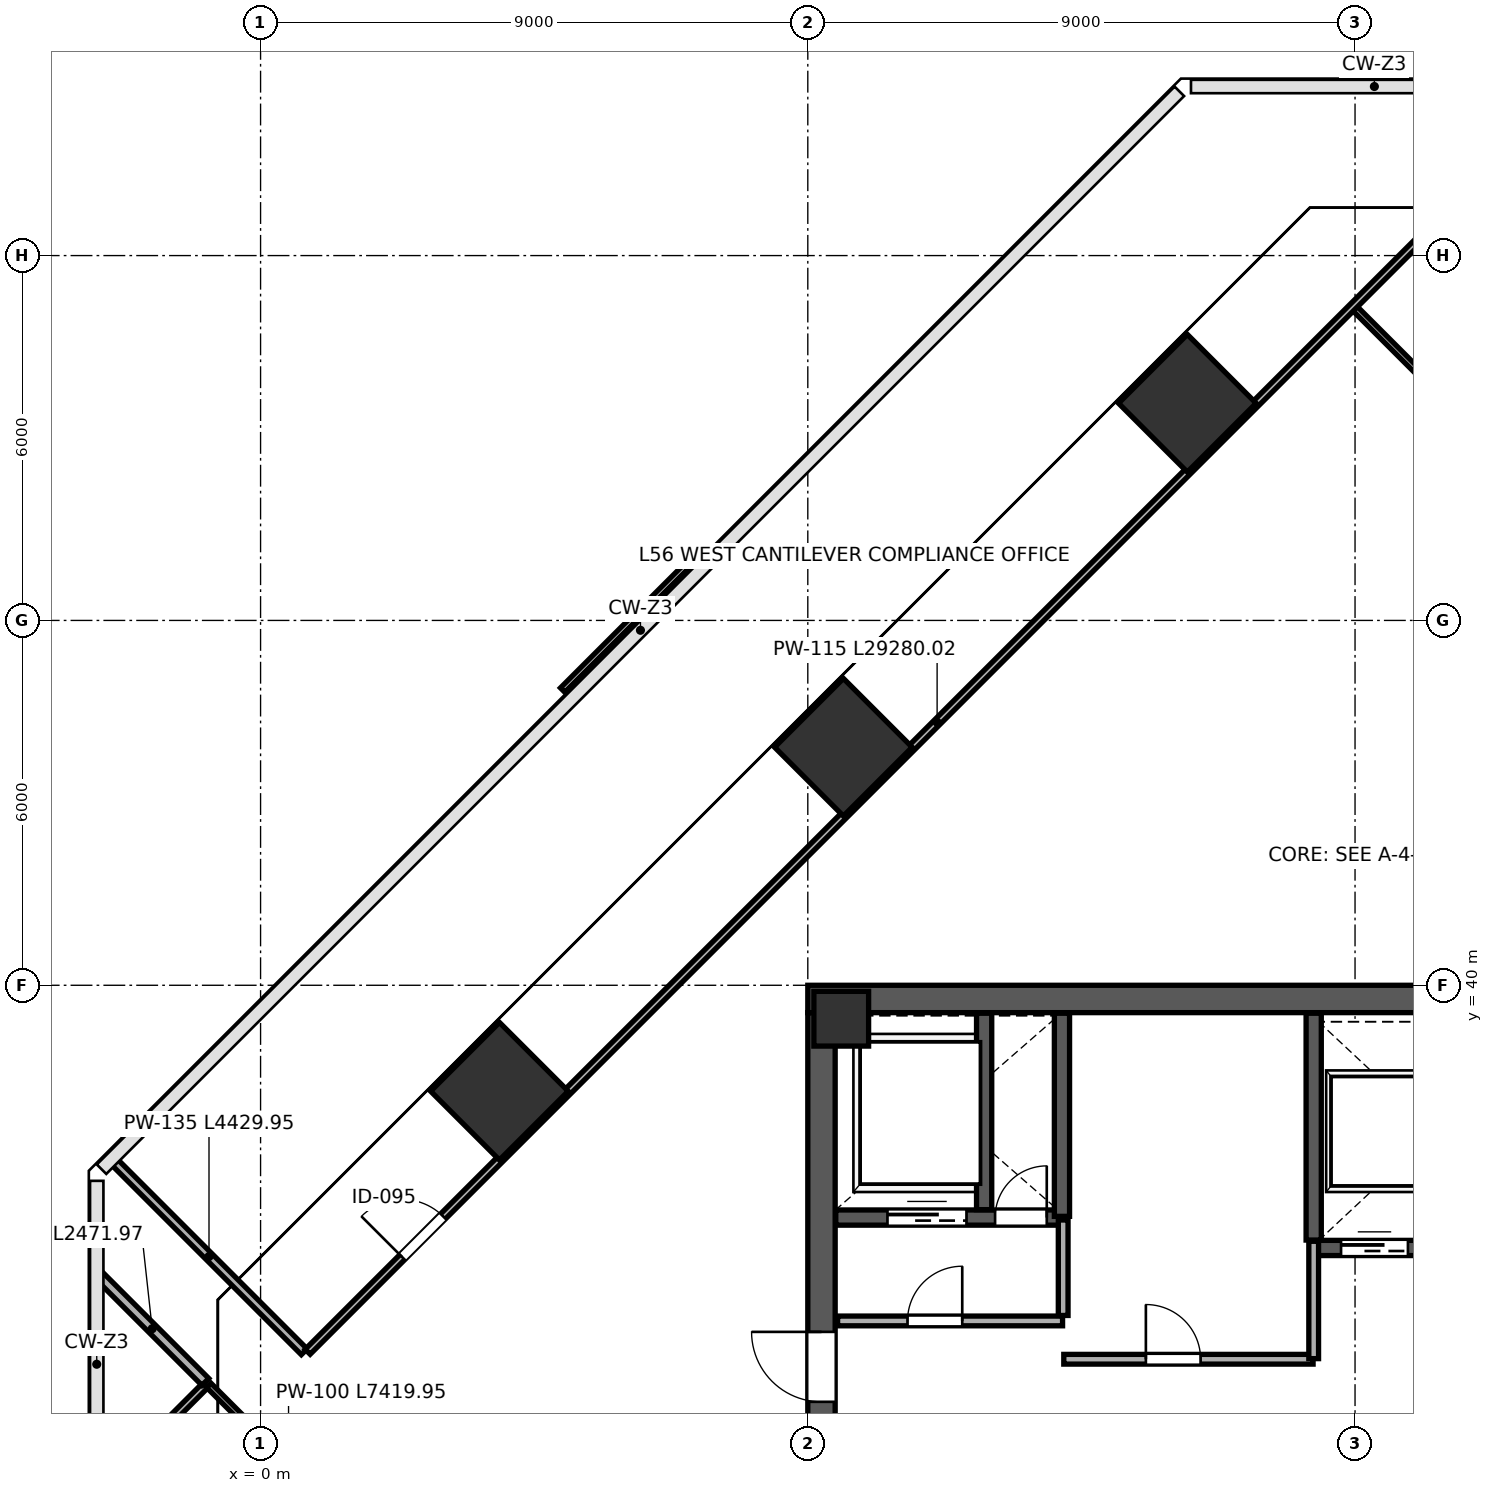
"""IFC4 building model, lengths in metres.
Left out: names, types, materials, properties, quantities, classifications, styles, units other than length and angle.
Written with IfcOpenShell. Run it as: python <this file> out.ifc"""

import sys

from ifc_helpers import new_model, si_unit, direction, frame, frame_2d, origin, origin_2d, place, context, subcontext, project, spatial, rectangle, extrude, source, transform, mapped, element, fill, save


model = new_model("IFC4")
c1 = context("Model", 3, precision=1e-05, world=origin(), true_north=direction((0.0, 1.0)))
c2 = subcontext(c1, "Body", "Model", "MODEL_VIEW")
j1 = project(units=[si_unit("LENGTHUNIT", "METRE"), si_unit("PLANEANGLEUNIT", "RADIAN")], contexts=[c1])
p1 = place(None, origin())
s1 = spatial("IfcSite", under=j1, at=p1, CompositionType="ELEMENT")
p2 = place(p1, origin())
s2 = spatial("IfcBuilding", under=s1, at=p2, CompositionType="ELEMENT")
p3 = place(p2, frame((0.0, 0.0, 250.0)))
s3 = spatial("IfcBuildingStorey", under=s2, at=p3, CompositionType="ELEMENT", Elevation=250.0)
m1 = source(origin(), c2, "Body", "SweptSolid", [
    extrude(rectangle(XDim=0.9, YDim=0.9, at=origin_2d()), origin(), (0.0, 0.0, 1.0), 4.198),
])
p4 = place(p3, frame((9.55, 39.45, 0.001), z_axis=(0.0, 0.0, 1.0), x_axis=(1.0, 0.0, 0.0)))
e1 = element("IfcColumn", 1, at=p4, inside=s3, PredefinedType="COLUMN", context=c2, shape_type="MappedRepresentation", body=[
    mapped(m1, transform((0.0, 0.0, 0.0), scale=1.0)),
])
m2 = source(origin(), c2, "Body", "SweptSolid", [
    extrude(rectangle(XDim=1.6, YDim=1.6, at=origin_2d()), origin(), (0.0, 0.0, 1.0), 4.198),
])
for number, where, z_axis, x_axis in (
    (2, (3.928, 38.258, 0.001), (0.0, 0.0, 1.0), (-0.707, 0.707, 0.0)),
    (3, (9.585, 43.915, 0.001), (0.0, 0.0, 1.0), (-0.707, 0.707, 0.0)),
    (4, (15.242, 49.572, 0.001), (0.0, 0.0, 1.0), (-0.707, 0.707, 0.0)),
):
    element("IfcColumn", number, at=place(p3, frame(where, z_axis=z_axis, x_axis=x_axis)), inside=s3, PredefinedType="COLUMN", context=c2, shape_type="MappedRepresentation", body=[
        mapped(m2, transform((0.0, 0.0, 0.0), scale=1.0)),
    ])
p5 = place(p3, frame((9.225, 24.45, 0.0), z_axis=(0.0, 0.0, 1.0), x_axis=(0.0, 1.0, 0.0)))
e5 = element("IfcWall", 5, at=p5, inside=s3, PredefinedType="SHEAR", context=c2, shape_type="SweptSolid", body=[
    extrude(rectangle(XDim=15.1, YDim=0.45, at=frame_2d((7.55, 0.0))), origin(), (0.0, 0.0, 1.0), 3.96),
])
p6 = place(p5, frame((8.7, 0.0, 0.0)))
e6 = element("IfcOpeningElement", 6, at=p6, cuts=e5, PredefinedType="OPENING", context=c2, shape_type="SweptSolid", body=[
    extrude(rectangle(XDim=1.15, YDim=2.2, at=frame_2d((0.575, 1.1))), frame((0.0, 0.235, 0.0), z_axis=(0.0, -1.0, 0.0), x_axis=(1.0, 0.0, 0.0)), (0.0, 0.0, 1.0), 0.47),
])
p7 = place(p3, frame((9.0, 39.775, 0.0), z_axis=(0.0, 0.0, 1.0), x_axis=(1.0, 0.0, 0.0)))
e7 = element("IfcWall", 7, at=p7, inside=s3, PredefinedType="SHEAR", context=c2, shape_type="SweptSolid", body=[
    extrude(rectangle(XDim=18.0, YDim=0.45, at=frame_2d((9.0, 0.0))), origin(), (0.0, 0.0, 1.0), 3.96),
])
p8 = place(p3, frame((9.46, 36.18, 0.0), z_axis=(0.0, 0.0, 1.0), x_axis=(1.0, 0.0, 0.0)))
e8 = element("IfcWall", 8, at=p8, inside=s3, PredefinedType="SHEAR", context=c2, shape_type="SweptSolid", body=[
    extrude(rectangle(XDim=3.79, YDim=0.25, at=frame_2d((1.895, 0.0))), origin(), (0.0, 0.0, 1.0), 3.96),
])
p9 = place(p8, frame((2.62, 0.0, 0.0)))
e9 = element("IfcOpeningElement", 9, at=p9, cuts=e8, PredefinedType="OPENING", context=c2, shape_type="SweptSolid", body=[
    extrude(rectangle(XDim=0.85, YDim=2.1, at=frame_2d((0.425, 1.05))), frame((0.0, 0.135, 0.0), z_axis=(0.0, -1.0, 0.0), x_axis=(1.0, 0.0, 0.0)), (0.0, 0.0, 1.0), 0.27),
])
p10 = place(p8, frame((0.85, 0.0, 0.0)))
e10 = element("IfcOpeningElement", 10, at=p10, cuts=e8, PredefinedType="OPENING", context=c2, shape_type="SweptSolid", body=[
    extrude(rectangle(XDim=1.3, YDim=2.25, at=frame_2d((0.65, 1.125))), frame((0.0, 0.135, 0.0), z_axis=(0.0, -1.0, 0.0), x_axis=(1.0, 0.0, 0.0)), (0.0, 0.0, 1.0), 0.27),
])
p11 = place(p3, frame((11.9, 36.31, 0.0), z_axis=(0.0, 0.0, 1.0), x_axis=(0.0, 1.0, 0.0)))
e11 = element("IfcWall", 11, at=p11, inside=s3, PredefinedType="SHEAR", context=c2, shape_type="SweptSolid", body=[
    extrude(rectangle(XDim=3.23, YDim=0.25, at=frame_2d((1.615, 0.0))), origin(), (0.0, 0.0, 1.0), 3.96),
])
p12 = place(p3, frame((13.18, 36.2, 0.0), z_axis=(0.0, 0.0, 1.0), x_axis=(0.0, 1.0, 0.0)))
e12 = element("IfcWall", 12, at=p12, inside=s3, PredefinedType="SHEAR", context=c2, shape_type="SweptSolid", body=[
    extrude(rectangle(XDim=3.34, YDim=0.25, at=frame_2d((1.67, 0.0))), origin(), (0.0, 0.0, 1.0), 3.96),
])
p13 = place(p3, frame((17.32, 35.68, 0.0), z_axis=(0.0, 0.0, 1.0), x_axis=(1.0, 0.0, 0.0)))
e13 = element("IfcWall", 13, at=p13, inside=s3, PredefinedType="SHEAR", context=c2, shape_type="SweptSolid", body=[
    extrude(rectangle(XDim=3.87, YDim=0.25, at=frame_2d((1.935, 0.0))), origin(), (0.0, 0.0, 1.0), 3.96),
])
p14 = place(p13, frame((0.45, 0.0, 0.0)))
e14 = element("IfcOpeningElement", 14, at=p14, cuts=e13, PredefinedType="OPENING", context=c2, shape_type="SweptSolid", body=[
    extrude(rectangle(XDim=1.1, YDim=2.2, at=frame_2d((0.55, 1.1))), frame((0.0, 0.135, 0.0), z_axis=(0.0, -1.0, 0.0), x_axis=(1.0, 0.0, 0.0)), (0.0, 0.0, 1.0), 0.27),
])
p15 = place(p13, frame((2.35, 0.0, 0.0)))
e15 = element("IfcOpeningElement", 15, at=p15, cuts=e13, PredefinedType="OPENING", context=c2, shape_type="SweptSolid", body=[
    extrude(rectangle(XDim=1.1, YDim=2.2, at=frame_2d((0.55, 1.1))), frame((0.0, 0.135, 0.0), z_axis=(0.0, -1.0, 0.0), x_axis=(1.0, 0.0, 0.0)), (0.0, 0.0, 1.0), 0.27),
])
p16 = place(p3, frame((17.32, 35.81, 0.0), z_axis=(0.0, 0.0, 1.0), x_axis=(0.0, 1.0, 0.0)))
e16 = element("IfcWall", 16, at=p16, inside=s3, PredefinedType="SHEAR", context=c2, shape_type="SweptSolid", body=[
    extrude(rectangle(XDim=3.73, YDim=0.25, at=frame_2d((1.865, 0.0))), origin(), (0.0, 0.0, 1.0), 3.96),
])
p17 = place(p3, frame((9.49, 34.48, 0.0), z_axis=(0.0, 0.0, 1.0), x_axis=(1.0, 0.0, 0.0)))
e17 = element("IfcWall", 17, at=p17, inside=s3, PredefinedType="PARTITIONING", context=c2, shape_type="SweptSolid", body=[
    extrude(rectangle(XDim=3.7, YDim=0.16, at=frame_2d((1.85, 0.0))), origin(), (0.0, 0.0, 1.0), 3.96),
])
p18 = place(p17, frame((1.15, 0.0, 0.0)))
e18 = element("IfcOpeningElement", 18, at=p18, cuts=e17, PredefinedType="OPENING", context=c2, shape_type="SweptSolid", body=[
    extrude(rectangle(XDim=0.9, YDim=2.15, at=frame_2d((0.45, 1.075))), frame((0.0, 0.09, 0.0), z_axis=(0.0, -1.0, 0.0), x_axis=(1.0, 0.0, 0.0)), (0.0, 0.0, 1.0), 0.18),
])
p19 = place(p3, frame((13.2, 34.57, 0.0), z_axis=(0.0, 0.0, 1.0), x_axis=(0.0, 1.0, 0.0)))
e19 = element("IfcWall", 19, at=p19, inside=s3, PredefinedType="PARTITIONING", context=c2, shape_type="SweptSolid", body=[
    extrude(rectangle(XDim=1.57, YDim=0.16, at=frame_2d((0.785, 0.0))), origin(), (0.0, 0.0, 1.0), 3.96),
])
p20 = place(p3, frame((13.21, 33.85, 0.0), z_axis=(0.0, 0.0, 1.0), x_axis=(1.0, 0.0, 0.0)))
e20 = element("IfcWall", 20, at=p20, inside=s3, PredefinedType="PARTITIONING", context=c2, shape_type="SweptSolid", body=[
    extrude(rectangle(XDim=4.1, YDim=0.16, at=frame_2d((2.05, 0.0))), origin(), (0.0, 0.0, 1.0), 3.96),
])
p21 = place(p20, frame((1.35, 0.0, 0.0)))
e21 = element("IfcOpeningElement", 21, at=p21, cuts=e20, PredefinedType="OPENING", context=c2, shape_type="SweptSolid", body=[
    extrude(rectangle(XDim=0.9, YDim=2.15, at=frame_2d((0.45, 1.075))), frame((0.0, 0.09, 0.0), z_axis=(0.0, -1.0, 0.0), x_axis=(1.0, 0.0, 0.0)), (0.0, 0.0, 1.0), 0.18),
])
p22 = place(p3, frame((17.32, 33.86, 0.0), z_axis=(0.0, 0.0, 1.0), x_axis=(0.0, 1.0, 0.0)))
e22 = element("IfcWall", 22, at=p22, inside=s3, PredefinedType="PARTITIONING", context=c2, shape_type="SweptSolid", body=[
    extrude(rectangle(XDim=1.93, YDim=0.16, at=frame_2d((0.965, 0.0))), origin(), (0.0, 0.0, 1.0), 3.96),
])
p23 = place(p3, frame((-2.656, 31.673, 0.0), z_axis=(0.0, 0.0, 1.0), x_axis=(0.707106781187, 0.707106781187, 0.0)))
e23 = element("IfcWall", 23, at=p23, inside=s3, PredefinedType="PARTITIONING", context=c2, shape_type="SweptSolid", body=[
    extrude(rectangle(XDim=2.472, YDim=0.115, at=frame_2d((1.236, 0.0))), origin(), (0.0, 0.0, 1.0), 3.96),
])
p24 = place(p3, frame((-2.656, 35.226, 0.0), z_axis=(0.0, 0.0, 1.0), x_axis=(0.707106781187, -0.707106781187, 0.0)))
e24 = element("IfcWall", 24, at=p24, inside=s3, PredefinedType="PARTITIONING", context=c2, shape_type="SweptSolid", body=[
    extrude(rectangle(XDim=2.472, YDim=0.16, at=frame_2d((1.236, 0.0))), origin(), (0.0, 0.0, 1.0), 3.96),
])
p25 = place(p3, frame((-0.852, 33.421, 0.0), z_axis=(0.0, 0.0, 1.0), x_axis=(0.707090329382, -0.707123232608, 0.0)))
e25 = element("IfcWall", 25, at=p25, inside=s3, PredefinedType="PARTITIONING", context=c2, shape_type="SweptSolid", body=[
    extrude(rectangle(XDim=7.42, YDim=0.1, at=frame_2d((3.71, 0.0))), origin(), (0.0, 0.0, 1.0), 3.96),
])
p26 = place(p25, frame((2.9, 0.0, 0.0)))
e26 = element("IfcOpeningElement", 26, at=p26, cuts=e25, PredefinedType="OPENING", context=c2, shape_type="SweptSolid", body=[
    extrude(rectangle(XDim=0.9, YDim=2.15, at=frame_2d((0.45, 1.075))), frame((0.0, 0.06, 0.0), z_axis=(0.0, -1.0, 0.0), x_axis=(1.0, 0.0, 0.0)), (0.0, 0.0, 1.0), 0.12),
])
p27 = place(p25, frame((5.0, 0.0, 0.0)))
e27 = element("IfcOpeningElement", 27, at=p27, cuts=e25, PredefinedType="OPENING", context=c2, shape_type="SweptSolid", body=[
    extrude(rectangle(XDim=0.95, YDim=2.15, at=frame_2d((0.475, 1.075))), frame((0.0, 0.06, 0.0), z_axis=(0.0, -1.0, 0.0), x_axis=(1.0, 0.0, 0.0)), (0.0, 0.0, 1.0), 0.12),
])
p28 = place(p3, frame((17.993, 51.134, 0.0), z_axis=(0.0, 0.0, 1.0), x_axis=(0.707106781187, -0.707106781187, 0.0)))
e28 = element("IfcWall", 28, at=p28, inside=s3, PredefinedType="PARTITIONING", context=c2, shape_type="SweptSolid", body=[
    extrude(rectangle(XDim=22.27, YDim=0.1, at=frame_2d((11.135, 0.0))), origin(), (0.0, 0.0, 1.0), 3.96),
])
p29 = place(p28, frame((10.8, 0.0, 0.0)))
e29 = element("IfcOpeningElement", 29, at=p29, cuts=e28, PredefinedType="OPENING", context=c2, shape_type="SweptSolid", body=[
    extrude(rectangle(XDim=0.95, YDim=2.15, at=frame_2d((0.475, 1.075))), frame((0.0, 0.06, 0.0), z_axis=(0.0, -1.0, 0.0), x_axis=(1.0, 0.0, 0.0)), (0.0, 0.0, 1.0), 0.12),
])
p30 = place(p3, frame((-2.414, 37.105, 0.0), z_axis=(0.0, 0.0, 1.0), x_axis=(0.707106781187, -0.707106781187, 0.0)))
e30 = element("IfcWall", 30, at=p30, inside=s3, PredefinedType="PARTITIONING", context=c2, shape_type="SweptSolid", body=[
    extrude(rectangle(XDim=4.43, YDim=0.135, at=frame_2d((2.215, 0.0))), origin(), (0.0, 0.0, 1.0), 3.96),
])
p31 = place(p3, frame((0.775, 33.973, 0.0), z_axis=(0.0, 0.0, 1.0), x_axis=(0.707106781187, 0.707106781187, 0.0)))
e31 = element("IfcWall", 31, at=p31, inside=s3, PredefinedType="PARTITIONING", context=c2, shape_type="SweptSolid", body=[
    extrude(rectangle(XDim=29.28, YDim=0.115, at=frame_2d((14.64, 0.0))), origin(), (0.0, 0.0, 1.0), 3.96),
])
p32 = place(p31, frame((2.2, 0.0, 0.0)))
e32 = element("IfcOpeningElement", 32, at=p32, cuts=e31, PredefinedType="OPENING", context=c2, shape_type="SweptSolid", body=[
    extrude(rectangle(XDim=0.95, YDim=2.15, at=frame_2d((0.475, 1.075))), frame((0.0, 0.067, 0.0), z_axis=(0.0, -1.0, 0.0), x_axis=(1.0, 0.0, 0.0)), (0.0, 0.0, 1.0), 0.135),
])
m3 = source(origin(), c2, "Body", "SweptSolid", [
    extrude(rectangle(XDim=1.15, YDim=2.2, at=frame_2d((0.575, 1.1))), frame((0.0, 0.025, 0.0), z_axis=(0.0, -1.0, 0.0), x_axis=(1.0, 0.0, 0.0)), (0.0, 0.0, 1.0), 0.05),
])
p33 = place(p6, origin())
e33 = element("IfcDoor", 33, at=p33, inside=s3, OperationType="SINGLE_SWING_RIGHT", PredefinedType="DOOR", context=c2, shape_type="MappedRepresentation", body=[
    mapped(m3, transform((0.0, 0.0, 0.0), scale=1.0)),
])
fill(e6, e33)
m4 = source(origin(), c2, "Body", "SweptSolid", [
    extrude(rectangle(XDim=0.85, YDim=2.1, at=frame_2d((0.425, 1.05))), frame((0.0, 0.025, 0.0), z_axis=(0.0, -1.0, 0.0), x_axis=(1.0, 0.0, 0.0)), (0.0, 0.0, 1.0), 0.05),
])
p34 = place(p9, origin())
e34 = element("IfcDoor", 34, at=p34, inside=s3, OperationType="SINGLE_SWING_RIGHT", PredefinedType="DOOR", context=c2, shape_type="MappedRepresentation", body=[
    mapped(m4, transform((0.0, 0.0, 0.0), scale=1.0)),
])
fill(e9, e34)
m5 = source(origin(), c2, "Body", "SweptSolid", [
    extrude(rectangle(XDim=1.1, YDim=2.2, at=frame_2d((0.55, 1.1))), frame((0.0, 0.025, 0.0), z_axis=(0.0, -1.0, 0.0), x_axis=(1.0, 0.0, 0.0)), (0.0, 0.0, 1.0), 0.05),
])
p35 = place(p14, origin())
e35 = element("IfcDoor", 35, at=p35, inside=s3, OperationType="SLIDING_TO_LEFT", PredefinedType="DOOR", context=c2, shape_type="MappedRepresentation", body=[
    mapped(m5, transform((0.0, 0.0, 0.0), scale=1.0)),
])
fill(e14, e35)
m6 = source(origin(), c2, "Body", "SweptSolid", [
    extrude(rectangle(XDim=1.3, YDim=2.25, at=frame_2d((0.65, 1.125))), frame((0.0, 0.025, 0.0), z_axis=(0.0, -1.0, 0.0), x_axis=(1.0, 0.0, 0.0)), (0.0, 0.0, 1.0), 0.05),
])
p36 = place(p10, origin())
e36 = element("IfcDoor", 36, at=p36, inside=s3, OperationType="SLIDING_TO_LEFT", PredefinedType="DOOR", context=c2, shape_type="MappedRepresentation", body=[
    mapped(m6, transform((0.0, 0.0, 0.0), scale=1.0)),
])
fill(e10, e36)
m7 = source(origin(), c2, "Body", "SweptSolid", [
    extrude(rectangle(XDim=0.9, YDim=2.15, at=frame_2d((0.45, 1.075))), frame((0.0, 0.025, 0.0), z_axis=(0.0, -1.0, 0.0), x_axis=(1.0, 0.0, 0.0)), (0.0, 0.0, 1.0), 0.05),
])
p37 = place(p18, origin())
e37 = element("IfcDoor", 37, at=p37, inside=s3, OperationType="SINGLE_SWING_RIGHT", PredefinedType="DOOR", context=c2, shape_type="MappedRepresentation", body=[
    mapped(m7, transform((0.0, 0.0, 0.0), scale=1.0)),
])
fill(e18, e37)
p38 = place(p21, origin())
e38 = element("IfcDoor", 38, at=p38, inside=s3, OperationType="SINGLE_SWING_LEFT", PredefinedType="DOOR", context=c2, shape_type="MappedRepresentation", body=[
    mapped(m7, transform((0.0, 0.0, 0.0), scale=1.0)),
])
fill(e21, e38)
m8 = source(origin(), c2, "Body", "SweptSolid", [
    extrude(rectangle(XDim=0.95, YDim=2.15, at=frame_2d((0.475, 1.075))), frame((0.0, 0.025, 0.0), z_axis=(0.0, -1.0, 0.0), x_axis=(1.0, 0.0, 0.0)), (0.0, 0.0, 1.0), 0.05),
])
p39 = place(p32, origin())
e39 = element("IfcDoor", 39, at=p39, inside=s3, OperationType="SINGLE_SWING_LEFT", PredefinedType="DOOR", context=c2, shape_type="MappedRepresentation", body=[
    mapped(m8, transform((0.0, 0.0, 0.0), scale=1.0)),
])
fill(e32, e39)
save(model, sys.argv[1])
